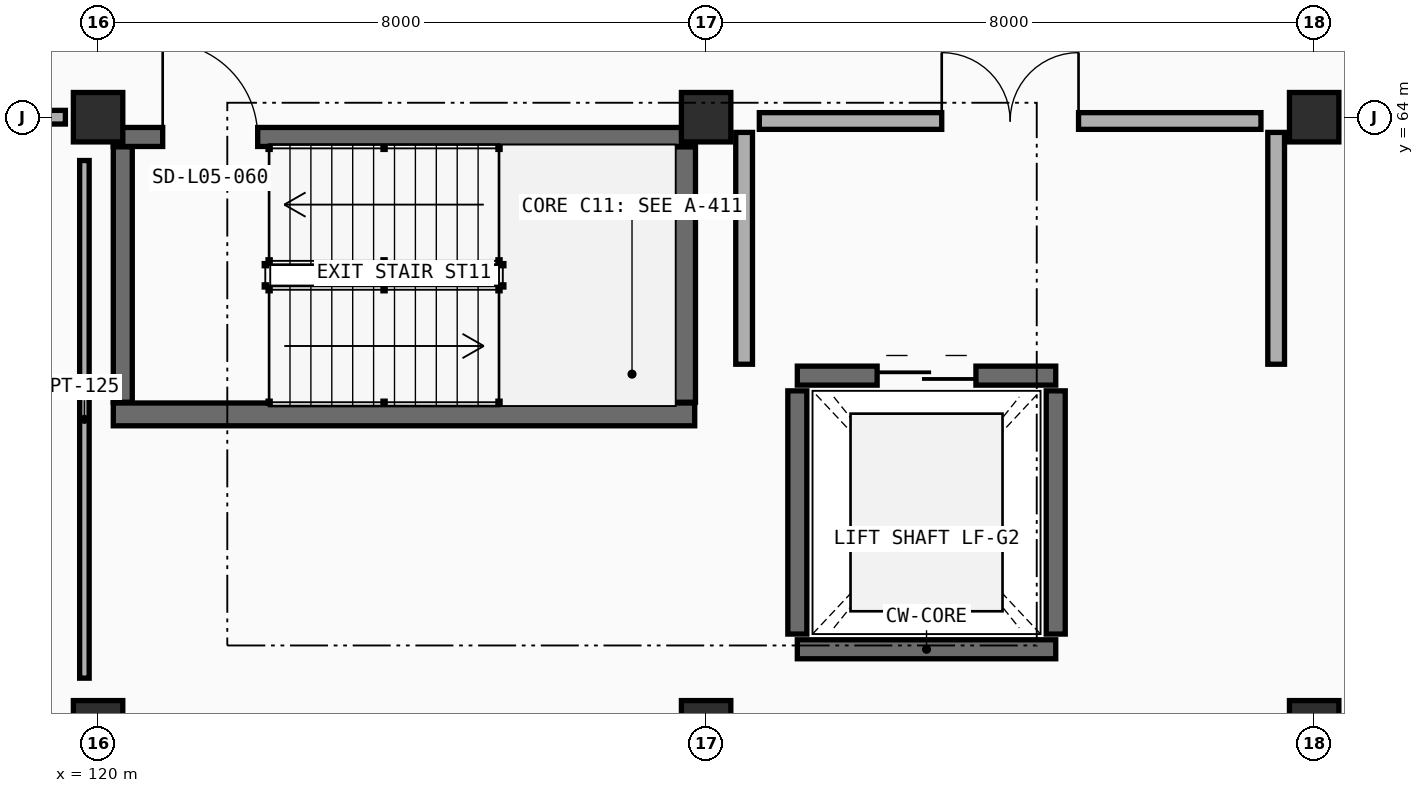
"""IFC4 building model, lengths in metres.
Left out: names, types, materials, properties, quantities, classifications, styles, units other than length and angle.
Written with IfcOpenShell. Run it as: python <this file> out.ifc"""

import sys

from ifc_helpers import new_model, si_unit, direction, frame, frame_2d, origin, origin_2d, place, context, subcontext, project, spatial, rectangle, extrude, element, fill, save


model = new_model("IFC4")
c1 = context("Model", 3, precision=1e-05, world=origin(), true_north=direction((0.0, 1.0)))
c2 = subcontext(c1, "Body", "Model", "MODEL_VIEW")
j1 = project(units=[si_unit("LENGTHUNIT", "METRE"), si_unit("PLANEANGLEUNIT", "RADIAN")], contexts=[c1])
p1 = place(None, origin())
s1 = spatial("IfcSite", under=j1, at=p1, CompositionType="ELEMENT")
p2 = place(p1, origin())
s2 = spatial("IfcBuilding", under=s1, at=p2, CompositionType="ELEMENT")
p3 = place(p2, frame((0.0, 0.0, 18.0)))
s3 = spatial("IfcBuildingStorey", under=s2, at=p3, CompositionType="ELEMENT", Elevation=18.0)
for number, where, z_axis, x_axis in (
    (1, (120.0, 56.0, 0.0), (0.0, 0.0, 1.0), (1.0, 0.0, 0.0)),
    (2, (128.0, 56.0, 0.0), (0.0, 0.0, 1.0), (1.0, 0.0, 0.0)),
    (3, (136.0, 56.0, 0.0), (0.0, 0.0, 1.0), (1.0, 0.0, 0.0)),
    (4, (120.0, 64.0, 0.0), (0.0, 0.0, 1.0), (1.0, 0.0, 0.0)),
    (5, (128.0, 64.0, 0.0), (0.0, 0.0, 1.0), (1.0, 0.0, 0.0)),
    (6, (136.0, 64.0, 0.0), (0.0, 0.0, 1.0), (1.0, 0.0, 0.0)),
):
    element("IfcColumn", number, at=place(p3, frame(where, z_axis=z_axis, x_axis=x_axis)), inside=s3, PredefinedType="COLUMN", context=c2, shape_type="SweptSolid", body=[
        extrude(rectangle(XDim=0.65, YDim=0.65, at=origin_2d()), origin(), (0.0, 0.0, 1.0), 4.2),
    ])
p4 = place(p3, frame((120.2, 60.09, 0.0), z_axis=(0.0, 0.0, 1.0), x_axis=(1.0, 0.0, 0.0)))
e7 = element("IfcWall", 7, at=p4, inside=s3, PredefinedType="SHEAR", context=c2, shape_type="SweptSolid", body=[
    extrude(rectangle(XDim=7.65, YDim=0.3, at=frame_2d((3.825, 0.0))), origin(), (0.0, 0.0, 1.0), 4.2),
])
p5 = place(p3, frame((127.71, 60.25, 0.0), z_axis=(0.0, 0.0, 1.0), x_axis=(0.0, 1.0, 0.0)))
e8 = element("IfcWall", 8, at=p5, inside=s3, PredefinedType="SHEAR", context=c2, shape_type="SweptSolid", body=[
    extrude(rectangle(XDim=3.36, YDim=0.3, at=frame_2d((1.68, 0.0))), origin(), (0.0, 0.0, 1.0), 4.2),
])
p6 = place(p3, frame((120.2, 63.74, 0.0), z_axis=(0.0, 0.0, 1.0), x_axis=(1.0, 0.0, 0.0)))
e9 = element("IfcWall", 9, at=p6, inside=s3, PredefinedType="SOLIDWALL", context=c2, shape_type="SweptSolid", body=[
    extrude(rectangle(XDim=7.65, YDim=0.25, at=frame_2d((3.825, 0.0))), origin(), (0.0, 0.0, 1.0), 4.2),
])
p7 = place(p6, frame((0.65, 0.0, 0.0)))
e10 = element("IfcOpeningElement", 10, at=p7, cuts=e9, PredefinedType="OPENING", context=c2, shape_type="SweptSolid", body=[
    extrude(rectangle(XDim=1.25, YDim=2.15, at=frame_2d((0.625, 1.075))), frame((0.0, 0.135, 0.0), z_axis=(0.0, -1.0, 0.0), x_axis=(1.0, 0.0, 0.0)), (0.0, 0.0, 1.0), 0.27),
])
p8 = place(p3, frame((120.325, 60.25, 0.0), z_axis=(0.0, 0.0, 1.0), x_axis=(0.0, 1.0, 0.0)))
e11 = element("IfcWall", 11, at=p8, inside=s3, PredefinedType="SOLIDWALL", context=c2, shape_type="SweptSolid", body=[
    extrude(rectangle(XDim=3.36, YDim=0.25, at=frame_2d((1.68, 0.0))), origin(), (0.0, 0.0, 1.0), 4.2),
])
p9 = place(p3, frame((129.2, 57.0, 0.0), z_axis=(0.0, 0.0, 1.0), x_axis=(1.0, 0.0, 0.0)))
e12 = element("IfcWall", 12, at=p9, inside=s3, PredefinedType="SOLIDWALL", context=c2, shape_type="SweptSolid", body=[
    extrude(rectangle(XDim=3.4, YDim=0.25, at=frame_2d((1.7, 0.0))), origin(), (0.0, 0.0, 1.0), 4.2),
])
p10 = place(p3, frame((129.2, 60.6, 0.0), z_axis=(0.0, 0.0, 1.0), x_axis=(1.0, 0.0, 0.0)))
e13 = element("IfcWall", 13, at=p10, inside=s3, PredefinedType="SOLIDWALL", context=c2, shape_type="SweptSolid", body=[
    extrude(rectangle(XDim=3.4, YDim=0.25, at=frame_2d((1.7, 0.0))), origin(), (0.0, 0.0, 1.0), 4.2),
])
p11 = place(p10, frame((1.05, 0.0, 0.0)))
e14 = element("IfcOpeningElement", 14, at=p11, cuts=e13, PredefinedType="OPENING", context=c2, shape_type="SweptSolid", body=[
    extrude(rectangle(XDim=1.3, YDim=2.2, at=frame_2d((0.65, 1.1))), frame((0.0, 0.135, 0.0), z_axis=(0.0, -1.0, 0.0), x_axis=(1.0, 0.0, 0.0)), (0.0, 0.0, 1.0), 0.27),
])
for number, where, z_axis, x_axis in (
    (15, (129.2, 57.2, 0.0), (0.0, 0.0, 1.0), (0.0, 1.0, 0.0)),
    (16, (132.6, 57.2, 0.0), (0.0, 0.0, 1.0), (0.0, 1.0, 0.0)),
):
    element("IfcWall", number, at=place(p3, frame(where, z_axis=z_axis, x_axis=x_axis)), inside=s3, PredefinedType="SOLIDWALL", context=c2, shape_type="SweptSolid", body=[
        extrude(rectangle(XDim=3.2, YDim=0.25, at=frame_2d((1.6, 0.0))), origin(), (0.0, 0.0, 1.0), 4.2),
    ])
p12 = place(p3, frame((128.7, 63.95, 0.0), z_axis=(0.0, 0.0, 1.0), x_axis=(1.0, 0.0, 0.0)))
e17 = element("IfcWall", 17, at=p12, inside=s3, PredefinedType="PARTITIONING", context=c2, shape_type="SweptSolid", body=[
    extrude(rectangle(XDim=6.6, YDim=0.22, at=frame_2d((3.3, 0.0))), origin(), (0.0, 0.0, 1.0), 3.3),
])
p13 = place(p12, frame((2.4, 0.0, 0.0)))
e18 = element("IfcOpeningElement", 18, at=p13, cuts=e17, PredefinedType="OPENING", context=c2, shape_type="SweptSolid", body=[
    extrude(rectangle(XDim=1.8, YDim=2.2, at=frame_2d((0.9, 1.1))), frame((0.0, 0.12, 0.0), z_axis=(0.0, -1.0, 0.0), x_axis=(1.0, 0.0, 0.0)), (0.0, 0.0, 1.0), 0.24),
])
for number, where, z_axis, x_axis in (
    (19, (128.5, 60.75, 0.0), (0.0, 0.0, 1.0), (0.0, 1.0, 0.0)),
    (20, (135.5, 60.75, 0.0), (0.0, 0.0, 1.0), (0.0, 1.0, 0.0)),
):
    element("IfcWall", number, at=place(p3, frame(where, z_axis=z_axis, x_axis=x_axis)), inside=s3, PredefinedType="PARTITIONING", context=c2, shape_type="SweptSolid", body=[
        extrude(rectangle(XDim=3.05, YDim=0.22, at=frame_2d((1.525, 0.0))), origin(), (0.0, 0.0, 1.0), 3.3),
    ])
p14 = place(p3, frame((96.43, 64.0, 0.0), z_axis=(0.0, 0.0, 1.0), x_axis=(1.0, 0.0, 0.0)))
e21 = element("IfcWall", 21, at=p14, inside=s3, PredefinedType="PARTITIONING", context=c2, shape_type="SweptSolid", body=[
    extrude(rectangle(XDim=23.14, YDim=0.18, at=frame_2d((11.57, 0.0))), origin(), (0.0, 0.0, 1.0), 3.3),
])
p15 = place(p14, frame((3.05, 0.0, 0.0)))
e22 = element("IfcOpeningElement", 22, at=p15, cuts=e21, PredefinedType="OPENING", context=c2, shape_type="SweptSolid", body=[
    extrude(rectangle(XDim=1.04, YDim=2.15, at=frame_2d((0.52, 1.075))), frame((0.0, 0.1, 0.0), z_axis=(0.0, -1.0, 0.0), x_axis=(1.0, 0.0, 0.0)), (0.0, 0.0, 1.0), 0.2),
])
p16 = place(p3, frame((119.82, 56.62, 0.0), z_axis=(0.0, 0.0, 1.0), x_axis=(0.0, 1.0, 0.0)))
e23 = element("IfcWall", 23, at=p16, inside=s3, PredefinedType="PARTITIONING", context=c2, shape_type="SweptSolid", body=[
    extrude(rectangle(XDim=6.81, YDim=0.125, at=frame_2d((3.405, 0.0))), origin(), (0.0, 0.0, 1.0), 3.3),
])
p17 = place(p7, origin())
e24 = element("IfcDoor", 24, at=p17, inside=s3, OperationType="SINGLE_SWING_LEFT", PredefinedType="DOOR", context=c2, shape_type="SweptSolid", body=[
    extrude(rectangle(XDim=1.25, YDim=2.15, at=frame_2d((0.625, 1.075))), frame((0.0, 0.025, 0.0), z_axis=(0.0, -1.0, 0.0), x_axis=(1.0, 0.0, 0.0)), (0.0, 0.0, 1.0), 0.05),
])
fill(e10, e24)
p18 = place(p11, origin())
e25 = element("IfcDoor", 25, at=p18, inside=s3, OperationType="DOUBLE_DOOR_SLIDING", PredefinedType="DOOR", context=c2, shape_type="SweptSolid", body=[
    extrude(rectangle(XDim=1.3, YDim=2.2, at=frame_2d((0.65, 1.1))), frame((0.0, 0.025, 0.0), z_axis=(0.0, -1.0, 0.0), x_axis=(1.0, 0.0, 0.0)), (0.0, 0.0, 1.0), 0.05),
])
fill(e14, e25)
p19 = place(p13, origin())
e26 = element("IfcDoor", 26, at=p19, inside=s3, OperationType="DOUBLE_DOOR_SINGLE_SWING", PredefinedType="DOOR", context=c2, shape_type="SweptSolid", body=[
    extrude(rectangle(XDim=1.8, YDim=2.2, at=frame_2d((0.9, 1.1))), frame((0.0, 0.025, 0.0), z_axis=(0.0, -1.0, 0.0), x_axis=(1.0, 0.0, 0.0)), (0.0, 0.0, 1.0), 0.05),
])
fill(e18, e26)
save(model, sys.argv[1])
